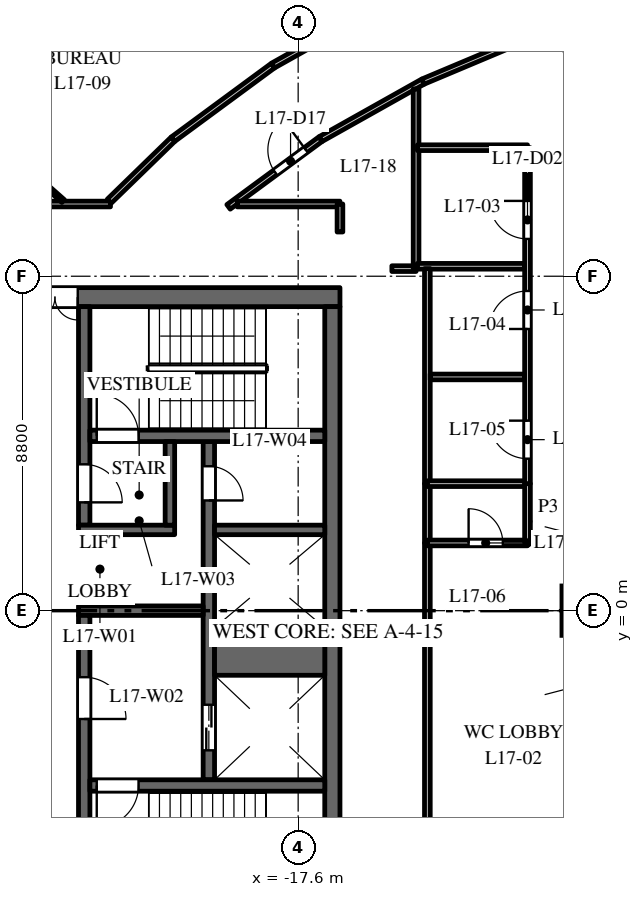
"""IFC4 building model, lengths in metres.
Left out: names, types, materials, properties, quantities, classifications, styles, units other than length and angle.
Written with IfcOpenShell. Run it as: python <this file> out.ifc"""

import sys

from ifc_helpers import new_model, si_unit, direction, frame, frame_2d, origin, origin_2d, place, context, subcontext, project, spatial, rectangle, extrude, element, fill, save


model = new_model("IFC4")
c1 = context("Model", 3, precision=1e-05, world=origin(), true_north=direction((0.0, 1.0)))
c2 = subcontext(c1, "Body", "Model", "MODEL_VIEW")
j1 = project(units=[si_unit("LENGTHUNIT", "METRE"), si_unit("PLANEANGLEUNIT", "RADIAN")], contexts=[c1])
p1 = place(None, origin())
s1 = spatial("IfcSite", under=j1, at=p1, CompositionType="ELEMENT")
p2 = place(p1, origin())
s2 = spatial("IfcBuilding", under=s1, at=p2, CompositionType="ELEMENT")
p3 = place(p2, frame((0.0, 0.0, 78.5)))
s3 = spatial("IfcBuildingStorey", under=s2, at=p3, CompositionType="ELEMENT", Elevation=78.5)
p4 = place(p3, frame((-10.008, 0.0, 0.0), z_axis=(0.0, 0.0, 1.0), x_axis=(0.0, -1.0, 0.0)))
e1 = element("IfcColumn", 1, at=p4, inside=s3, PredefinedType="COLUMN", context=c2, shape_type="SweptSolid", body=[
    extrude(rectangle(XDim=1.3, YDim=1.3, at=origin_2d()), origin(), (0.0, 0.0, 1.0), 4.0),
])
p5 = place(p3, frame((-16.5, 8.25, 0.0), z_axis=(0.0, 0.0, 1.0), x_axis=(-1.0, 0.0, 0.0)))
e2 = element("IfcWall", 2, at=p5, inside=s3, PredefinedType="SHEAR", context=c2, shape_type="SweptSolid", body=[
    extrude(rectangle(XDim=15.0, YDim=0.5, at=frame_2d((7.5, 0.0))), origin(), (0.0, 0.0, 1.0), 3.7),
])
p6 = place(p5, frame((6.9, 0.0, 0.0)))
e3 = element("IfcOpeningElement", 3, at=p6, cuts=e2, PredefinedType="OPENING", context=c2, shape_type="SweptSolid", body=[
    extrude(rectangle(XDim=1.2, YDim=2.1, at=frame_2d((0.6, 1.05))), frame((0.0, 0.26, 0.0), z_axis=(0.0, -1.0, 0.0), x_axis=(1.0, 0.0, 0.0)), (0.0, 0.0, 1.0), 0.52),
])
p7 = place(p5, frame((12.95, 0.0, 0.0)))
e4 = element("IfcOpeningElement", 4, at=p7, cuts=e2, PredefinedType="OPENING", context=c2, shape_type="SweptSolid", body=[
    extrude(rectangle(XDim=0.9, YDim=2.1, at=frame_2d((0.45, 1.05))), frame((0.0, 0.26, 0.0), z_axis=(0.0, -1.0, 0.0), x_axis=(1.0, 0.0, 0.0)), (0.0, 0.0, 1.0), 0.52),
])
p8 = place(p3, frame((-19.95, -4.45, 0.0), z_axis=(0.0, 0.0, 1.0), x_axis=(0.0, 1.0, 0.0)))
e5 = element("IfcWall", 5, at=p8, inside=s3, PredefinedType="SHEAR", context=c2, shape_type="SweptSolid", body=[
    extrude(rectangle(XDim=8.9, YDim=0.3, at=frame_2d((4.45, 0.0))), origin(), (0.0, 0.0, 1.0), 3.7),
])
p9 = place(p8, frame((0.775, 0.0, 0.0)))
e6 = element("IfcOpeningElement", 6, at=p9, cuts=e5, PredefinedType="OPENING", context=c2, shape_type="SweptSolid", body=[
    extrude(rectangle(XDim=1.2, YDim=2.1, at=frame_2d((0.6, 1.05))), frame((0.0, 0.16, 0.0), z_axis=(0.0, -1.0, 0.0), x_axis=(1.0, 0.0, 0.0)), (0.0, 0.0, 1.0), 0.32),
])
p10 = place(p8, frame((7.35, 0.0, 0.0)))
e7 = element("IfcOpeningElement", 7, at=p10, cuts=e5, PredefinedType="OPENING", context=c2, shape_type="SweptSolid", body=[
    extrude(rectangle(XDim=0.9, YDim=2.1, at=frame_2d((0.45, 1.05))), frame((0.0, 0.16, 0.0), z_axis=(0.0, -1.0, 0.0), x_axis=(1.0, 0.0, 0.0)), (0.0, 0.0, 1.0), 0.32),
])
p11 = place(p3, frame((-20.1, 0.0, 0.0), z_axis=(0.0, 0.0, 1.0), x_axis=(-1.0, 0.0, 0.0)))
e8 = element("IfcWall", 8, at=p11, inside=s3, PredefinedType="SHEAR", context=c2, shape_type="SweptSolid", body=[
    extrude(rectangle(XDim=3.28, YDim=0.25, at=frame_2d((1.64, 0.0))), origin(), (0.0, 0.0, 1.0), 3.7),
])
p12 = place(p3, frame((-16.7, -8.0, 0.0), z_axis=(0.0, 0.0, 1.0), x_axis=(0.0, 1.0, 0.0)))
e9 = element("IfcWall", 9, at=p12, inside=s3, PredefinedType="SHEAR", context=c2, shape_type="SweptSolid", body=[
    extrude(rectangle(XDim=16.0, YDim=0.4, at=frame_2d((8.0, 0.0))), origin(), (0.0, 0.0, 1.0), 3.7),
])
p13 = place(p3, frame((-16.9, -1.075, 0.0), z_axis=(0.0, 0.0, 1.0), x_axis=(-1.0, 0.0, 0.0)))
e10 = element("IfcWall", 10, at=p13, inside=s3, PredefinedType="SHEAR", context=c2, shape_type="SweptSolid", body=[
    extrude(rectangle(XDim=2.9, YDim=1.25, at=frame_2d((1.45, 0.0))), origin(), (0.0, 0.0, 1.0), 3.7),
])
p14 = place(p3, frame((-16.9, 2.125, 0.0), z_axis=(0.0, 0.0, 1.0), x_axis=(-1.0, 0.0, 0.0)))
e11 = element("IfcWall", 11, at=p14, inside=s3, PredefinedType="SHEAR", context=c2, shape_type="SweptSolid", body=[
    extrude(rectangle(XDim=2.9, YDim=0.25, at=frame_2d((1.45, 0.0))), origin(), (0.0, 0.0, 1.0), 3.7),
])
p15 = place(p3, frame((-23.23, 2.25, 0.0), z_axis=(0.0, 0.0, 1.0), x_axis=(0.0, 1.0, 0.0)))
e12 = element("IfcWall", 12, at=p15, inside=s3, PredefinedType="SHEAR", context=c2, shape_type="SweptSolid", body=[
    extrude(rectangle(XDim=5.75, YDim=0.3, at=frame_2d((2.875, 0.0))), origin(), (0.0, 0.0, 1.0), 3.7),
])
p16 = place(p15, frame((0.6, 0.0, 0.0)))
e13 = element("IfcOpeningElement", 13, at=p16, cuts=e12, PredefinedType="OPENING", context=c2, shape_type="SweptSolid", body=[
    extrude(rectangle(XDim=1.0, YDim=2.1, at=frame_2d((0.5, 1.05))), frame((0.0, 0.16, 0.0), z_axis=(0.0, -1.0, 0.0), x_axis=(1.0, 0.0, 0.0)), (0.0, 0.0, 1.0), 0.32),
])
p17 = place(p3, frame((-23.23, -8.0, 0.0), z_axis=(0.0, 0.0, 1.0), x_axis=(0.0, 1.0, 0.0)))
e14 = element("IfcWall", 14, at=p17, inside=s3, PredefinedType="SHEAR", context=c2, shape_type="SweptSolid", body=[
    extrude(rectangle(XDim=7.875, YDim=0.3, at=frame_2d((3.938, 0.0))), origin(), (0.0, 0.0, 1.0), 3.7),
])
p18 = place(p17, frame((5.15, 0.0, 0.0)))
e15 = element("IfcOpeningElement", 15, at=p18, cuts=e14, PredefinedType="OPENING", context=c2, shape_type="SweptSolid", body=[
    extrude(rectangle(XDim=1.1, YDim=2.1, at=frame_2d((0.55, 1.05))), frame((0.0, 0.16, 0.0), z_axis=(0.0, -1.0, 0.0), x_axis=(1.0, 0.0, 0.0)), (0.0, 0.0, 1.0), 0.32),
])
p19 = place(p3, frame((-16.9, 4.6, 0.0), z_axis=(0.0, 0.0, 1.0), x_axis=(-1.0, 0.0, 0.0)))
e16 = element("IfcWall", 16, at=p19, inside=s3, PredefinedType="SHEAR", context=c2, shape_type="SweptSolid", body=[
    extrude(rectangle(XDim=6.18, YDim=0.3, at=frame_2d((3.09, 0.0))), origin(), (0.0, 0.0, 1.0), 3.7),
])
p20 = place(p19, frame((4.9, 0.0, 0.0)))
e17 = element("IfcOpeningElement", 17, at=p20, cuts=e16, PredefinedType="OPENING", context=c2, shape_type="SweptSolid", body=[
    extrude(rectangle(XDim=1.1, YDim=2.1, at=frame_2d((0.55, 1.05))), frame((0.0, 0.16, 0.0), z_axis=(0.0, -1.0, 0.0), x_axis=(1.0, 0.0, 0.0)), (0.0, 0.0, 1.0), 0.32),
])
p21 = place(p3, frame((-16.9, -4.6, 0.0), z_axis=(0.0, 0.0, 1.0), x_axis=(-1.0, 0.0, 0.0)))
e18 = element("IfcWall", 18, at=p21, inside=s3, PredefinedType="SHEAR", context=c2, shape_type="SweptSolid", body=[
    extrude(rectangle(XDim=6.18, YDim=0.3, at=frame_2d((3.09, 0.0))), origin(), (0.0, 0.0, 1.0), 3.7),
])
p22 = place(p21, frame((4.9, 0.0, 0.0)))
e19 = element("IfcOpeningElement", 19, at=p22, cuts=e18, PredefinedType="OPENING", context=c2, shape_type="SweptSolid", body=[
    extrude(rectangle(XDim=1.1, YDim=2.1, at=frame_2d((0.55, 1.05))), frame((0.0, 0.16, 0.0), z_axis=(0.0, -1.0, 0.0), x_axis=(1.0, 0.0, 0.0)), (0.0, 0.0, 1.0), 0.32),
])
p23 = place(p3, frame((-20.85, 2.125, 0.0), z_axis=(0.0, 0.0, 1.0), x_axis=(-1.0, 0.0, 0.0)))
e20 = element("IfcWall", 20, at=p23, inside=s3, PredefinedType="SHEAR", context=c2, shape_type="SweptSolid", body=[
    extrude(rectangle(XDim=2.53, YDim=0.25, at=frame_2d((1.265, 0.0))), origin(), (0.0, 0.0, 1.0), 3.7),
])
p24 = place(p3, frame((-20.975, 2.25, 0.0), z_axis=(0.0, 0.0, 1.0), x_axis=(0.0, 1.0, 0.0)))
e21 = element("IfcWall", 21, at=p24, inside=s3, PredefinedType="SHEAR", context=c2, shape_type="SweptSolid", body=[
    extrude(rectangle(XDim=2.2, YDim=0.25, at=frame_2d((1.1, 0.0))), origin(), (0.0, 0.0, 1.0), 3.7),
])
p25 = place(p3, frame((-31.5, 10.7, 0.0), z_axis=(0.0, 0.0, 1.0), x_axis=(1.0, 0.0, 0.0)))
e22 = element("IfcWall", 22, at=p25, inside=s3, PredefinedType="PARTITIONING", context=c2, shape_type="SweptSolid", body=[
    extrude(rectangle(XDim=8.961, YDim=0.15, at=frame_2d((4.48, 0.0))), origin(), (0.0, 0.0, 1.0), 3.1),
])
p26 = place(p25, frame((5.153, 0.0, 0.0)))
e23 = element("IfcOpeningElement", 23, at=p26, cuts=e22, PredefinedType="OPENING", context=c2, shape_type="SweptSolid", body=[
    extrude(rectangle(XDim=1.0, YDim=2.1, at=frame_2d((0.5, 1.05))), frame((0.0, 0.085, 0.0), z_axis=(0.0, -1.0, 0.0), x_axis=(1.0, 0.0, 0.0)), (0.0, 0.0, 1.0), 0.17),
])
p27 = place(p3, frame((-29.569, 15.895, 0.0), z_axis=(0.0, 0.0, 1.0), x_axis=(0.748985701008, -0.662586160198, 0.0)))
e24 = element("IfcWall", 24, at=p27, inside=s3, PredefinedType="PARTITIONING", context=c2, shape_type="SweptSolid", body=[
    extrude(rectangle(XDim=7.723, YDim=0.1, at=frame_2d((3.861, 0.0))), origin(), (0.0, 0.0, 1.0), 2.85),
])
p28 = place(p3, frame((-22.57, 10.775, 0.0), z_axis=(0.0, 0.0, 1.0), x_axis=(0.717045582263, 0.697026278527, 0.0)))
e25 = element("IfcWall", 25, at=p28, inside=s3, PredefinedType="PARTITIONING", context=c2, shape_type="SweptSolid", body=[
    extrude(rectangle(XDim=2.342, YDim=0.15, at=frame_2d((1.171, 0.0))), origin(), (0.0, 0.0, 1.0), 3.7),
])
p29 = place(p3, frame((-20.891, 12.407, 0.0), z_axis=(0.0, 0.0, 1.0), x_axis=(0.805303685339, 0.592862525701, 0.0)))
e26 = element("IfcWall", 26, at=p29, inside=s3, PredefinedType="PARTITIONING", context=c2, shape_type="SweptSolid", body=[
    extrude(rectangle(XDim=3.267, YDim=0.15, at=frame_2d((1.634, 0.0))), origin(), (0.0, 0.0, 1.0), 2.75),
])
p30 = place(p3, frame((-19.432, 10.625, 0.0), z_axis=(0.0, 0.0, 1.0), x_axis=(0.805306738654, 0.592858378265, 0.0)))
e27 = element("IfcWall", 27, at=p30, inside=s3, PredefinedType="PARTITIONING", context=c2, shape_type="SweptSolid", body=[
    extrude(rectangle(XDim=3.007, YDim=0.15, at=frame_2d((1.504, 0.0))), origin(), (0.0, 0.0, 1.0), 2.75),
])
p31 = place(p30, frame((1.527, 0.0, 0.0)))
e28 = element("IfcOpeningElement", 28, at=p31, cuts=e27, PredefinedType="OPENING", context=c2, shape_type="SweptSolid", body=[
    extrude(rectangle(XDim=1.0, YDim=2.1, at=frame_2d((0.5, 1.05))), frame((0.0, 0.085, 0.0), z_axis=(0.0, -1.0, 0.0), x_axis=(1.0, 0.0, 0.0)), (0.0, 0.0, 1.0), 0.17),
])
p32 = place(p3, frame((-19.203, 10.7, 0.0), z_axis=(0.0, 0.0, 1.0), x_axis=(1.0, 0.0, 0.0)))
e29 = element("IfcWall", 29, at=p32, inside=s3, PredefinedType="PARTITIONING", context=c2, shape_type="SweptSolid", body=[
    extrude(rectangle(XDim=2.703, YDim=0.15, at=frame_2d((1.352, 0.0))), origin(), (0.0, 0.0, 1.0), 3.7),
])
p33 = place(p3, frame((-18.26, 14.344, 0.0), z_axis=(0.0, 0.0, 1.0), x_axis=(0.871958798398, 0.489579262118, 0.0)))
e30 = element("IfcWall", 30, at=p33, inside=s3, PredefinedType="PARTITIONING", context=c2, shape_type="SweptSolid", body=[
    extrude(rectangle(XDim=3.366, YDim=0.15, at=frame_2d((1.683, 0.0))), origin(), (0.0, 0.0, 1.0), 3.7),
])
p34 = place(p3, frame((-17.01, 12.408, 0.0), z_axis=(0.0, 0.0, 1.0), x_axis=(0.871977874087, 0.489545286059, 0.0)))
e31 = element("IfcWall", 31, at=p34, inside=s3, PredefinedType="PARTITIONING", context=c2, shape_type="SweptSolid", body=[
    extrude(rectangle(XDim=3.093, YDim=0.15, at=frame_2d((1.546, 0.0))), origin(), (0.0, 0.0, 1.0), 3.7),
])
p35 = place(p3, frame((-16.5, 9.964, 0.0), z_axis=(0.0, 0.0, 1.0), x_axis=(0.0, 1.0, 0.0)))
e32 = element("IfcWall", 32, at=p35, inside=s3, PredefinedType="PARTITIONING", context=c2, shape_type="SweptSolid", body=[
    extrude(rectangle(XDim=0.736, YDim=0.15, at=frame_2d((0.368, 0.0))), origin(), (0.0, 0.0, 1.0), 3.7),
])
p36 = place(p3, frame((-15.134, 9.0, 0.0), z_axis=(0.0, 0.0, 1.0), x_axis=(1.0, 0.0, 0.0)))
e33 = element("IfcWall", 33, at=p36, inside=s3, PredefinedType="PARTITIONING", context=c2, shape_type="SweptSolid", body=[
    extrude(rectangle(XDim=0.637, YDim=0.15, at=frame_2d((0.318, 0.0))), origin(), (0.0, 0.0, 1.0), 3.7),
])
p37 = place(p3, frame((-14.497, 9.0, 0.0), z_axis=(0.0, 0.0, 1.0), x_axis=(0.0, 1.0, 0.0)))
e34 = element("IfcWall", 34, at=p37, inside=s3, PredefinedType="PARTITIONING", context=c2, shape_type="SweptSolid", body=[
    extrude(rectangle(XDim=4.729, YDim=0.15, at=frame_2d((2.365, 0.0))), origin(), (0.0, 0.0, 1.0), 2.75),
])
p38 = place(p3, frame((-14.465, 9.062, 0.0), z_axis=(0.0, 0.0, 1.0), x_axis=(1.0, 0.0, 0.0)))
e35 = element("IfcWall", 35, at=p38, inside=s3, PredefinedType="PARTITIONING", context=c2, shape_type="SweptSolid", body=[
    extrude(rectangle(XDim=2.825, YDim=0.15, at=frame_2d((1.413, 0.0))), origin(), (0.0, 0.0, 1.0), 2.75),
])
p39 = place(p3, frame((-14.461, 12.182, 0.0), z_axis=(0.0, 0.0, 1.0), x_axis=(1.0, 0.0, 0.0)))
e36 = element("IfcWall", 36, at=p39, inside=s3, PredefinedType="PARTITIONING", context=c2, shape_type="SweptSolid", body=[
    extrude(rectangle(XDim=2.896, YDim=0.15, at=frame_2d((1.448, 0.0))), origin(), (0.0, 0.0, 1.0), 3.7),
])
p40 = place(p3, frame((-14.313, 13.922, 0.0), z_axis=(0.0, 0.0, 1.0), x_axis=(0.921799502591, 0.387666966638, 0.0)))
e37 = element("IfcWall", 37, at=p40, inside=s3, PredefinedType="PARTITIONING", context=c2, shape_type="SweptSolid", body=[
    extrude(rectangle(XDim=3.19, YDim=0.15, at=frame_2d((1.595, 0.0))), origin(), (0.0, 0.0, 1.0), 2.85),
])
p41 = place(p3, frame((-14.2, -9.0, 0.0), z_axis=(0.0, 0.0, 1.0), x_axis=(0.0, 1.0, 0.0)))
e38 = element("IfcWall", 38, at=p41, inside=s3, PredefinedType="PARTITIONING", context=c2, shape_type="SweptSolid", body=[
    extrude(rectangle(XDim=10.782, YDim=0.15, at=frame_2d((5.391, 0.0))), origin(), (0.0, 0.0, 1.0), 3.7),
])
p42 = place(p41, frame((0.65, 0.0, 0.0)))
e39 = element("IfcOpeningElement", 39, at=p42, cuts=e38, PredefinedType="OPENING", context=c2, shape_type="SweptSolid", body=[
    extrude(rectangle(XDim=1.0, YDim=2.1, at=frame_2d((0.5, 1.05))), frame((0.0, 0.085, 0.0), z_axis=(0.0, -1.0, 0.0), x_axis=(1.0, 0.0, 0.0)), (0.0, 0.0, 1.0), 0.17),
])
p43 = place(p3, frame((-14.2, 1.782, 0.0), z_axis=(0.0, 0.0, 1.0), x_axis=(0.0, 1.0, 0.0)))
e40 = element("IfcWall", 40, at=p43, inside=s3, PredefinedType="PARTITIONING", context=c2, shape_type="SweptSolid", body=[
    extrude(rectangle(XDim=1.56, YDim=0.15, at=frame_2d((0.78, 0.0))), origin(), (0.0, 0.0, 1.0), 3.7),
])
p44 = place(p3, frame((-14.2, 1.782, 0.0), z_axis=(0.0, 0.0, 1.0), x_axis=(1.0, 0.0, 0.0)))
e41 = element("IfcWall", 41, at=p44, inside=s3, PredefinedType="PARTITIONING", context=c2, shape_type="SweptSolid", body=[
    extrude(rectangle(XDim=2.635, YDim=0.15, at=frame_2d((1.317, 0.0))), origin(), (0.0, 0.0, 1.0), 3.7),
])
p45 = place(p44, frame((1.085, 0.0, 0.0)))
e42 = element("IfcOpeningElement", 42, at=p45, cuts=e41, PredefinedType="OPENING", context=c2, shape_type="SweptSolid", body=[
    extrude(rectangle(XDim=0.9, YDim=2.1, at=frame_2d((0.45, 1.05))), frame((0.0, 0.085, 0.0), z_axis=(0.0, -1.0, 0.0), x_axis=(1.0, 0.0, 0.0)), (0.0, 0.0, 1.0), 0.17),
])
p46 = place(p3, frame((-14.2, 3.342, 0.0), z_axis=(0.0, 0.0, 1.0), x_axis=(0.0, 1.0, 0.0)))
e43 = element("IfcWall", 43, at=p46, inside=s3, PredefinedType="PARTITIONING", context=c2, shape_type="SweptSolid", body=[
    extrude(rectangle(XDim=5.658, YDim=0.15, at=frame_2d((2.829, 0.0))), origin(), (0.0, 0.0, 1.0), 3.7),
])
p47 = place(p3, frame((-14.2, 3.342, 0.0), z_axis=(0.0, 0.0, 1.0), x_axis=(1.0, 0.0, 0.0)))
e44 = element("IfcWall", 44, at=p47, inside=s3, PredefinedType="PARTITIONING", context=c2, shape_type="SweptSolid", body=[
    extrude(rectangle(XDim=2.635, YDim=0.15, at=frame_2d((1.317, 0.0))), origin(), (0.0, 0.0, 1.0), 3.7),
])
p48 = place(p3, frame((-14.125, 6.15, 0.0), z_axis=(0.0, 0.0, 1.0), x_axis=(1.0, 0.0, 0.0)))
e45 = element("IfcWall", 45, at=p48, inside=s3, PredefinedType="PARTITIONING", context=c2, shape_type="SweptSolid", body=[
    extrude(rectangle(XDim=2.485, YDim=0.15, at=frame_2d((1.243, 0.0))), origin(), (0.0, 0.0, 1.0), 3.7),
])
p49 = place(p3, frame((-11.565, 1.782, 0.0), z_axis=(0.0, 0.0, 1.0), x_axis=(0.0, 1.0, 0.0)))
e46 = element("IfcWall", 46, at=p49, inside=s3, PredefinedType="PARTITIONING", context=c2, shape_type="SweptSolid", body=[
    extrude(rectangle(XDim=1.56, YDim=0.15, at=frame_2d((0.78, 0.0))), origin(), (0.0, 0.0, 1.0), 3.7),
])
p50 = place(p3, frame((-11.565, 3.342, 0.0), z_axis=(0.0, 0.0, 1.0), x_axis=(0.0, 1.0, 0.0)))
e47 = element("IfcWall", 47, at=p50, inside=s3, PredefinedType="PARTITIONING", context=c2, shape_type="SweptSolid", body=[
    extrude(rectangle(XDim=8.84, YDim=0.15, at=frame_2d((4.42, 0.0))), origin(), (0.0, 0.0, 1.0), 2.75),
])
p51 = place(p50, frame((6.44, 0.0, 0.0)))
e48 = element("IfcOpeningElement", 48, at=p51, cuts=e47, PredefinedType="OPENING", context=c2, shape_type="SweptSolid", body=[
    extrude(rectangle(XDim=1.0, YDim=2.1, at=frame_2d((0.5, 1.05))), frame((0.0, 0.085, 0.0), z_axis=(0.0, -1.0, 0.0), x_axis=(1.0, 0.0, 0.0)), (0.0, 0.0, 1.0), 0.17),
])
p52 = place(p50, frame((4.07, 0.0, 0.0)))
e49 = element("IfcOpeningElement", 49, at=p52, cuts=e47, PredefinedType="OPENING", context=c2, shape_type="SweptSolid", body=[
    extrude(rectangle(XDim=1.0, YDim=2.1, at=frame_2d((0.5, 1.05))), frame((0.0, 0.085, 0.0), z_axis=(0.0, -1.0, 0.0), x_axis=(1.0, 0.0, 0.0)), (0.0, 0.0, 1.0), 0.17),
])
p53 = place(p50, frame((0.658, 0.0, 0.0)))
e50 = element("IfcOpeningElement", 50, at=p53, cuts=e47, PredefinedType="OPENING", context=c2, shape_type="SweptSolid", body=[
    extrude(rectangle(XDim=1.0, YDim=2.1, at=frame_2d((0.5, 1.05))), frame((0.0, 0.085, 0.0), z_axis=(0.0, -1.0, 0.0), x_axis=(1.0, 0.0, 0.0)), (0.0, 0.0, 1.0), 0.17),
])
p54 = place(p9, origin())
e51 = element("IfcDoor", 51, at=p54, inside=s3, OperationType="DOUBLE_DOOR_SLIDING", PredefinedType="DOOR", context=c2, shape_type="SweptSolid", body=[
    extrude(rectangle(XDim=1.2, YDim=2.1, at=frame_2d((0.6, 1.05))), frame((0.0, 0.025, 0.0), z_axis=(0.0, -1.0, 0.0), x_axis=(1.0, 0.0, 0.0)), (0.0, 0.0, 1.0), 0.05),
])
fill(e6, e51)
p55 = place(p20, origin())
e52 = element("IfcDoor", 52, at=p55, inside=s3, OperationType="SINGLE_SWING_RIGHT", PredefinedType="DOOR", context=c2, shape_type="SweptSolid", body=[
    extrude(rectangle(XDim=1.1, YDim=2.1, at=frame_2d((0.55, 1.05))), frame((0.0, 0.025, 0.0), z_axis=(0.0, -1.0, 0.0), x_axis=(1.0, 0.0, 0.0)), (0.0, 0.0, 1.0), 0.05),
])
fill(e17, e52)
p56 = place(p22, origin())
e53 = element("IfcDoor", 53, at=p56, inside=s3, OperationType="SINGLE_SWING_LEFT", PredefinedType="DOOR", context=c2, shape_type="SweptSolid", body=[
    extrude(rectangle(XDim=1.1, YDim=2.1, at=frame_2d((0.55, 1.05))), frame((0.0, 0.025, 0.0), z_axis=(0.0, -1.0, 0.0), x_axis=(1.0, 0.0, 0.0)), (0.0, 0.0, 1.0), 0.05),
])
fill(e19, e53)
p57 = place(p18, origin())
e54 = element("IfcDoor", 54, at=p57, inside=s3, OperationType="SINGLE_SWING_LEFT", PredefinedType="DOOR", context=c2, shape_type="SweptSolid", body=[
    extrude(rectangle(XDim=1.1, YDim=2.1, at=frame_2d((0.55, 1.05))), frame((0.0, 0.025, 0.0), z_axis=(0.0, -1.0, 0.0), x_axis=(1.0, 0.0, 0.0)), (0.0, 0.0, 1.0), 0.05),
])
fill(e15, e54)
p58 = place(p16, origin())
e55 = element("IfcDoor", 55, at=p58, inside=s3, OperationType="SINGLE_SWING_LEFT", PredefinedType="DOOR", context=c2, shape_type="SweptSolid", body=[
    extrude(rectangle(XDim=1.0, YDim=2.1, at=frame_2d((0.5, 1.05))), frame((0.0, 0.025, 0.0), z_axis=(0.0, -1.0, 0.0), x_axis=(1.0, 0.0, 0.0)), (0.0, 0.0, 1.0), 0.05),
])
fill(e13, e55)
p59 = place(p6, origin())
e56 = element("IfcDoor", 56, at=p59, inside=s3, OperationType="DOUBLE_DOOR_DOUBLE_SWING", PredefinedType="DOOR", context=c2, shape_type="SweptSolid", body=[
    extrude(rectangle(XDim=1.2, YDim=2.1, at=frame_2d((0.6, 1.05))), frame((0.0, 0.025, 0.0), z_axis=(0.0, -1.0, 0.0), x_axis=(1.0, 0.0, 0.0)), (0.0, 0.0, 1.0), 0.05),
])
fill(e3, e56)
p60 = place(p10, origin())
e57 = element("IfcDoor", 57, at=p60, inside=s3, OperationType="SINGLE_SWING_LEFT", PredefinedType="DOOR", context=c2, shape_type="SweptSolid", body=[
    extrude(rectangle(XDim=0.9, YDim=2.1, at=frame_2d((0.45, 1.05))), frame((0.0, 0.025, 0.0), z_axis=(0.0, -1.0, 0.0), x_axis=(1.0, 0.0, 0.0)), (0.0, 0.0, 1.0), 0.05),
])
fill(e7, e57)
p61 = place(p51, origin())
e58 = element("IfcDoor", 58, at=p61, inside=s3, OperationType="SINGLE_SWING_RIGHT", PredefinedType="DOOR", context=c2, shape_type="SweptSolid", body=[
    extrude(rectangle(XDim=1.0, YDim=2.1, at=frame_2d((0.5, 1.05))), frame((0.0, 0.025, 0.0), z_axis=(0.0, -1.0, 0.0), x_axis=(1.0, 0.0, 0.0)), (0.0, 0.0, 1.0), 0.05),
])
fill(e48, e58)
p62 = place(p52, origin())
e59 = element("IfcDoor", 59, at=p62, inside=s3, OperationType="SINGLE_SWING_LEFT", PredefinedType="DOOR", context=c2, shape_type="SweptSolid", body=[
    extrude(rectangle(XDim=1.0, YDim=2.1, at=frame_2d((0.5, 1.05))), frame((0.0, 0.025, 0.0), z_axis=(0.0, -1.0, 0.0), x_axis=(1.0, 0.0, 0.0)), (0.0, 0.0, 1.0), 0.05),
])
fill(e49, e59)
p63 = place(p53, origin())
e60 = element("IfcDoor", 60, at=p63, inside=s3, OperationType="SINGLE_SWING_RIGHT", PredefinedType="DOOR", context=c2, shape_type="SweptSolid", body=[
    extrude(rectangle(XDim=1.0, YDim=2.1, at=frame_2d((0.5, 1.05))), frame((0.0, 0.025, 0.0), z_axis=(0.0, -1.0, 0.0), x_axis=(1.0, 0.0, 0.0)), (0.0, 0.0, 1.0), 0.05),
])
fill(e50, e60)
p64 = place(p45, origin())
e61 = element("IfcDoor", 61, at=p64, inside=s3, OperationType="SINGLE_SWING_LEFT", PredefinedType="DOOR", context=c2, shape_type="SweptSolid", body=[
    extrude(rectangle(XDim=0.9, YDim=2.1, at=frame_2d((0.45, 1.05))), frame((0.0, 0.025, 0.0), z_axis=(0.0, -1.0, 0.0), x_axis=(1.0, 0.0, 0.0)), (0.0, 0.0, 1.0), 0.05),
])
fill(e42, e61)
p65 = place(p31, origin())
e62 = element("IfcDoor", 62, at=p65, inside=s3, OperationType="SINGLE_SWING_RIGHT", PredefinedType="DOOR", context=c2, shape_type="SweptSolid", body=[
    extrude(rectangle(XDim=1.0, YDim=2.1, at=frame_2d((0.5, 1.05))), frame((0.0, 0.025, 0.0), z_axis=(0.0, -1.0, 0.0), x_axis=(1.0, 0.0, 0.0)), (0.0, 0.0, 1.0), 0.05),
])
fill(e28, e62)
save(model, sys.argv[1])
